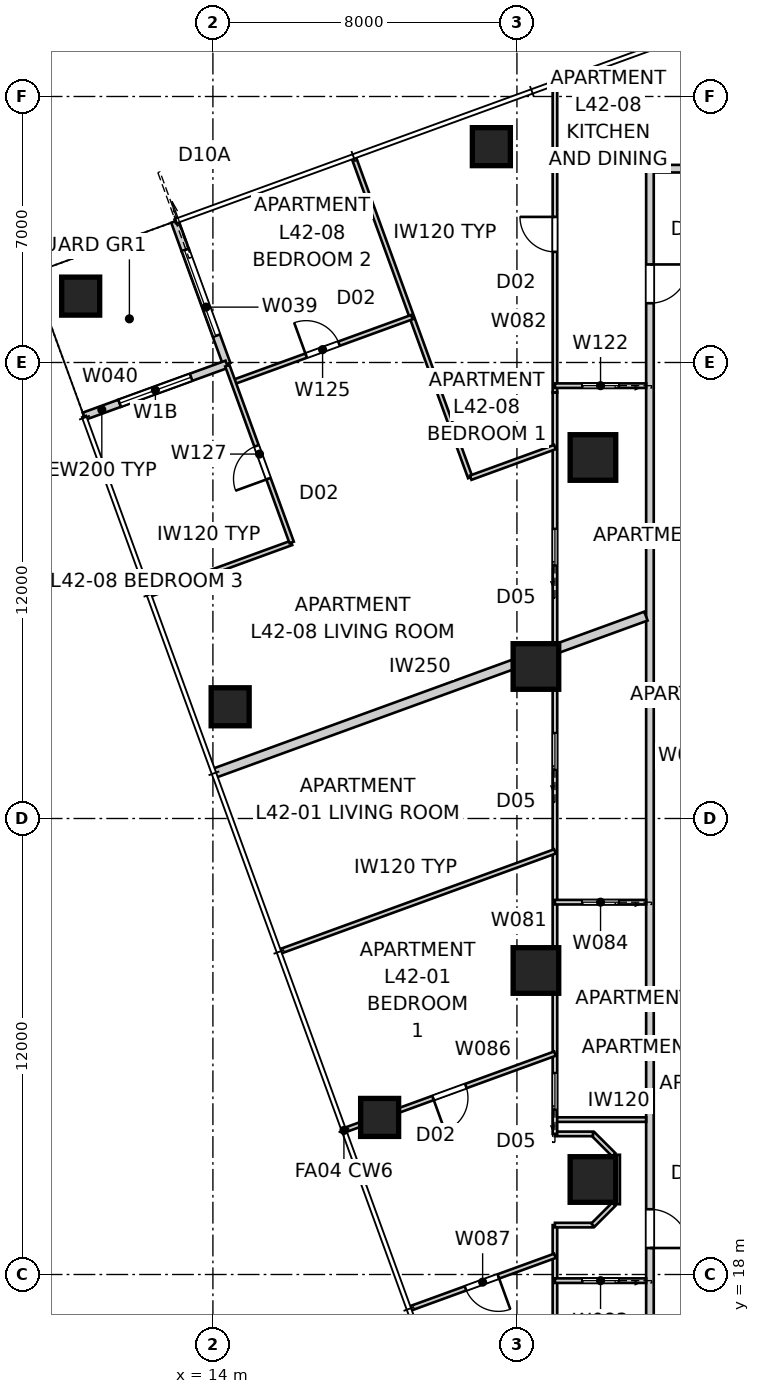
"""IFC4 building model, lengths in metres.
Left out: names, types, materials, properties, quantities, classifications, styles, units other than length and angle.
Written with IfcOpenShell. Run it as: python <this file> out.ifc"""

import sys

from ifc_helpers import new_model, si_unit, direction, frame, frame_2d, origin, origin_2d, place, context, subcontext, project, spatial, rectangle, extrude, element, fill, save


model = new_model("IFC4")
c1 = context("Model", 3, precision=1e-05, world=origin(), true_north=direction((0.0, 1.0)))
c2 = subcontext(c1, "Body", "Model", "MODEL_VIEW")
j1 = project(units=[si_unit("LENGTHUNIT", "METRE"), si_unit("PLANEANGLEUNIT", "RADIAN")], contexts=[c1])
p1 = place(None, origin())
s1 = spatial("IfcSite", under=j1, at=p1, CompositionType="ELEMENT")
p2 = place(p1, origin())
s2 = spatial("IfcBuilding", under=s1, at=p2, CompositionType="ELEMENT")
p3 = place(p2, frame((0.0, 0.0, 154.0)))
s3 = spatial("IfcBuildingStorey", under=s2, at=p3, CompositionType="ELEMENT", Elevation=154.0)
for number, where, z_axis, x_axis in (
    (1, (21.327, 47.68, 0.0), (0.0, 0.0, 1.0), (1.0, 0.0, 0.0)),
    (2, (10.521, 43.747, 0.0), (0.0, 0.0, 1.0), (1.0, 0.0, 0.0)),
    (3, (14.454, 32.94, 0.0), (0.0, 0.0, 1.0), (1.0, 0.0, 0.0)),
    (4, (18.387, 22.134, 0.0), (0.0, 0.0, 1.0), (1.0, 0.0, 0.0)),
):
    element("IfcColumn", number, at=place(p3, frame(where, z_axis=z_axis, x_axis=x_axis)), inside=s3, PredefinedType="COLUMN", context=c2, shape_type="SweptSolid", body=[
        extrude(rectangle(XDim=1.0, YDim=1.0, at=origin_2d()), origin(), (0.0, 0.0, 1.0), 3.4),
    ])
for number, where, z_axis, x_axis in (
    (5, (24.0, 39.5, 0.0), (0.0, 0.0, 1.0), (1.0, 0.0, 0.0)),
    (6, (22.5, 34.0, 0.0), (0.0, 0.0, 1.0), (1.0, 0.0, 0.0)),
    (7, (22.5, 26.0, 0.0), (0.0, 0.0, 1.0), (1.0, 0.0, 0.0)),
    (8, (24.0, 20.5, 0.0), (0.0, 0.0, 1.0), (1.0, 0.0, 0.0)),
):
    element("IfcColumn", number, at=place(p3, frame(where, z_axis=z_axis, x_axis=x_axis)), inside=s3, PredefinedType="COLUMN", context=c2, shape_type="SweptSolid", body=[
        extrude(rectangle(XDim=1.2, YDim=1.2, at=origin_2d()), origin(), (0.0, 0.0, 1.0), 3.4),
    ])
p4 = place(p3, frame((12.998, 45.712, 0.0), z_axis=(0.0, 0.0, 1.0), x_axis=(0.342110593602, -0.939659694648, 0.0)))
e9 = element("IfcWall", 9, at=p4, inside=s3, PredefinedType="SOLIDWALL", context=c2, shape_type="SweptSolid", body=[
    extrude(rectangle(XDim=0.8, YDim=0.2, at=frame_2d((0.4, 0.0))), origin(), (0.0, 0.0, 1.0), 3.25),
])
p5 = place(p3, frame((13.271, 44.96, 0.0), z_axis=(0.0, 0.0, 1.0), x_axis=(0.342018703306, -0.939693144909, 0.0)))
e10 = element("IfcWall", 10, at=p5, inside=s3, PredefinedType="SOLIDWALL", context=c2, shape_type="SweptSolid", body=[
    extrude(rectangle(XDim=3.2, YDim=0.2, at=frame_2d((1.6, 0.0))), origin(), (0.0, 0.0, 1.0), 2.721),
])
p6 = place(p5, origin())
e11 = element("IfcOpeningElement", 11, at=p6, cuts=e10, PredefinedType="OPENING", context=c2, shape_type="SweptSolid", body=[
    extrude(rectangle(XDim=2.4, YDim=2.1, at=frame_2d((1.2, 1.05))), frame((0.0, 0.11, 0.0), z_axis=(0.0, -1.0, 0.0), x_axis=(1.0, 0.0, 0.0)), (0.0, 0.0, 1.0), 0.22),
])
p7 = place(p3, frame((14.366, 41.953, 0.0), z_axis=(0.0, 0.0, 1.0), x_axis=(-0.939712609717, -0.341965219194, 0.0)))
e12 = element("IfcWall", 12, at=p7, inside=s3, PredefinedType="SOLIDWALL", context=c2, shape_type="SweptSolid", body=[
    extrude(rectangle(XDim=3.0, YDim=0.2, at=frame_2d((1.5, 0.0))), origin(), (0.0, 0.0, 1.0), 2.721),
])
p8 = place(p7, frame((1.0, 0.0, 0.45)))
e13 = element("IfcOpeningElement", 13, at=p8, cuts=e12, PredefinedType="OPENING", context=c2, shape_type="SweptSolid", body=[
    extrude(rectangle(XDim=2.0, YDim=1.8, at=frame_2d((1.0, 0.9))), frame((0.0, 0.11, 0.0), z_axis=(0.0, -1.0, 0.0), x_axis=(1.0, 0.0, 0.0)), (0.0, 0.0, 1.0), 0.22),
])
p9 = place(p3, frame((11.547, 40.927, 0.0), z_axis=(0.0, 0.0, 1.0), x_axis=(-0.939686455819, -0.342037080957, 0.0)))
e14 = element("IfcWall", 14, at=p9, inside=s3, PredefinedType="SOLIDWALL", context=c2, shape_type="SweptSolid", body=[
    extrude(rectangle(XDim=1.0, YDim=0.2, at=frame_2d((0.5, 0.0))), origin(), (0.0, 0.0, 1.0), 3.25),
])
p10 = place(p3, frame((33.098, 47.1, 0.0), z_axis=(0.0, 0.0, 1.0), x_axis=(-1.0, 0.0, 0.0)))
e15 = element("IfcWall", 15, at=p10, inside=s3, PredefinedType="PARTITIONING", context=c2, shape_type="SweptSolid", body=[
    extrude(rectangle(XDim=7.598, YDim=0.2, at=frame_2d((3.799, 0.0))), origin(), (0.0, 0.0, 1.0), 3.25),
])
p11 = place(p3, frame((25.5, 47.1, 0.0), z_axis=(0.0, 0.0, 1.0), x_axis=(0.0, -1.0, 0.0)))
e16 = element("IfcWall", 16, at=p11, inside=s3, PredefinedType="PARTITIONING", context=c2, shape_type="SweptSolid", body=[
    extrude(rectangle(XDim=33.4, YDim=0.2, at=frame_2d((16.7, 0.0))), origin(), (0.0, 0.0, 1.0), 3.25),
])
p12 = place(p11, frame((2.52, 0.0, 0.0)))
e17 = element("IfcOpeningElement", 17, at=p12, cuts=e16, PredefinedType="OPENING", context=c2, shape_type="SweptSolid", body=[
    extrude(rectangle(XDim=1.02, YDim=2.34, at=frame_2d((0.51, 1.17))), frame((0.0, 0.11, 0.0), z_axis=(0.0, -1.0, 0.0), x_axis=(1.0, 0.0, 0.0)), (0.0, 0.0, 1.0), 0.22),
])
p13 = place(p11, frame((27.383, 0.0, 0.0)))
e18 = element("IfcOpeningElement", 18, at=p13, cuts=e16, PredefinedType="OPENING", context=c2, shape_type="SweptSolid", body=[
    extrude(rectangle(XDim=1.02, YDim=2.1, at=frame_2d((0.51, 1.05))), frame((0.0, 0.11, 0.0), z_axis=(0.0, -1.0, 0.0), x_axis=(1.0, 0.0, 0.0)), (0.0, 0.0, 1.0), 0.22),
])
p14 = place(p3, frame((14.027, 31.188, 0.0), z_axis=(0.0, 0.0, 1.0), x_axis=(0.939693801585, 0.342016899091, 0.0)))
e19 = element("IfcWall", 19, at=p14, inside=s3, PredefinedType="PARTITIONING", context=c2, shape_type="SweptSolid", body=[
    extrude(rectangle(XDim=12.097, YDim=0.25, at=frame_2d((6.049, 0.0))), origin(), (0.0, 0.0, 1.0), 3.25),
])
p15 = place(p3, frame((23.0, 22.076, 0.0), z_axis=(0.0, 0.0, 1.0), x_axis=(1.0, 0.0, 0.0)))
e20 = element("IfcWall", 20, at=p15, inside=s3, PredefinedType="PARTITIONING", context=c2, shape_type="SweptSolid", body=[
    extrude(rectangle(XDim=2.4, YDim=0.12, at=frame_2d((1.2, 0.0))), origin(), (0.0, 0.0, 1.0), 3.25),
])
p16 = place(p3, frame((23.0, 11.2, 0.0), z_axis=(0.0, 0.0, 1.0), x_axis=(0.0, 1.0, 0.0)))
e21 = element("IfcWall", 21, at=p16, inside=s3, PredefinedType="PARTITIONING", context=c2, shape_type="SweptSolid", body=[
    extrude(rectangle(XDim=8.1, YDim=0.12, at=frame_2d((4.05, 0.0))), origin(), (0.0, 0.0, 1.0), 3.25),
])
p17 = place(p16, frame((3.849, 0.0, 0.0)))
e22 = element("IfcOpeningElement", 22, at=p17, cuts=e21, PredefinedType="OPENING", context=c2, shape_type="SweptSolid", body=[
    extrude(rectangle(XDim=0.96, YDim=2.1, at=frame_2d((0.48, 1.05))), frame((0.0, 0.07, 0.0), z_axis=(0.0, -1.0, 0.0), x_axis=(1.0, 0.0, 0.0)), (0.0, 0.0, 1.0), 0.14),
])
p18 = place(p3, frame((23.0, 19.3, 0.0), z_axis=(0.0, 0.0, 1.0), x_axis=(1.0, 0.0, 0.0)))
e23 = element("IfcWall", 23, at=p18, inside=s3, PredefinedType="PARTITIONING", context=c2, shape_type="SweptSolid", body=[
    extrude(rectangle(XDim=1.0, YDim=0.12, at=frame_2d((0.5, 0.0))), origin(), (0.0, 0.0, 1.0), 3.25),
])
p19 = place(p3, frame((24.0, 19.3, 0.0), z_axis=(0.0, 0.0, 1.0), x_axis=(0.707106781187, 0.707106781187, 0.0)))
e24 = element("IfcWall", 24, at=p19, inside=s3, PredefinedType="PARTITIONING", context=c2, shape_type="SweptSolid", body=[
    extrude(rectangle(XDim=0.778, YDim=0.12, at=frame_2d((0.389, 0.0))), origin(), (0.0, 0.0, 1.0), 3.25),
])
p20 = place(p3, frame((24.65, 19.85, 0.0), z_axis=(0.0, 0.0, 1.0), x_axis=(0.0, 1.0, 0.0)))
e25 = element("IfcWall", 25, at=p20, inside=s3, PredefinedType="PARTITIONING", context=c2, shape_type="SweptSolid", body=[
    extrude(rectangle(XDim=1.3, YDim=0.12, at=frame_2d((0.65, 0.0))), origin(), (0.0, 0.0, 1.0), 3.25),
])
p21 = place(p3, frame((24.55, 21.15, 0.0), z_axis=(0.0, 0.0, 1.0), x_axis=(-0.707106781187, 0.707106781187, 0.0)))
e26 = element("IfcWall", 26, at=p21, inside=s3, PredefinedType="PARTITIONING", context=c2, shape_type="SweptSolid", body=[
    extrude(rectangle(XDim=0.778, YDim=0.12, at=frame_2d((0.389, 0.0))), origin(), (0.0, 0.0, 1.0), 3.25),
])
p22 = place(p3, frame((24.0, 21.7, 0.0), z_axis=(0.0, 0.0, 1.0), x_axis=(-1.0, 0.0, 0.0)))
e27 = element("IfcWall", 27, at=p22, inside=s3, PredefinedType="PARTITIONING", context=c2, shape_type="SweptSolid", body=[
    extrude(rectangle(XDim=1.0, YDim=0.12, at=frame_2d((0.5, 0.0))), origin(), (0.0, 0.0, 1.0), 3.25),
])
p23 = place(p3, frame((23.0, 21.7, 0.0), z_axis=(0.0, 0.0, 1.0), x_axis=(0.0, 1.0, 0.0)))
e28 = element("IfcWall", 28, at=p23, inside=s3, PredefinedType="PARTITIONING", context=c2, shape_type="SweptSolid", body=[
    extrude(rectangle(XDim=19.512, YDim=0.12, at=frame_2d((9.756, 0.0))), origin(), (0.0, 0.0, 1.0), 2.55),
])
p24 = place(p23, frame((14.961, 0.0, 0.0)))
e29 = element("IfcOpeningElement", 29, at=p24, cuts=e28, PredefinedType="OPENING", context=c2, shape_type="SweptSolid", body=[
    extrude(rectangle(XDim=0.96, YDim=2.1, at=frame_2d((0.48, 1.05))), frame((0.0, 0.07, 0.0), z_axis=(0.0, -1.0, 0.0), x_axis=(1.0, 0.0, 0.0)), (0.0, 0.0, 1.0), 0.14),
])
p25 = place(p23, frame((0.641, 0.0, 0.0)))
e30 = element("IfcOpeningElement", 30, at=p25, cuts=e28, PredefinedType="OPENING", context=c2, shape_type="SweptSolid", body=[
    extrude(rectangle(XDim=0.96, YDim=2.1, at=frame_2d((0.48, 1.05))), frame((0.0, 0.07, 0.0), z_axis=(0.0, -1.0, 0.0), x_axis=(1.0, 0.0, 0.0)), (0.0, 0.0, 1.0), 0.14),
])
p26 = place(p23, frame((9.587, 0.0, 0.0)))
e31 = element("IfcOpeningElement", 31, at=p26, cuts=e28, PredefinedType="OPENING", context=c2, shape_type="SweptSolid", body=[
    extrude(rectangle(XDim=0.96, YDim=2.1, at=frame_2d((0.48, 1.05))), frame((0.0, 0.07, 0.0), z_axis=(0.0, -1.0, 0.0), x_axis=(1.0, 0.0, 0.0)), (0.0, 0.0, 1.0), 0.14),
])
p27 = place(p3, frame((25.4, 17.838, 0.0), z_axis=(0.0, 0.0, 1.0), x_axis=(-1.0, 0.0, 0.0)))
e32 = element("IfcWall", 32, at=p27, inside=s3, PredefinedType="PARTITIONING", context=c2, shape_type="SweptSolid", body=[
    extrude(rectangle(XDim=2.4, YDim=0.12, at=frame_2d((1.2, 0.0))), origin(), (0.0, 0.0, 1.0), 3.25),
])
p28 = place(p27, frame((0.72, 0.0, 0.0)))
e33 = element("IfcOpeningElement", 33, at=p28, cuts=e32, PredefinedType="OPENING", context=c2, shape_type="SweptSolid", body=[
    extrude(rectangle(XDim=0.96, YDim=2.1, at=frame_2d((0.48, 1.05))), frame((0.0, 0.07, 0.0), z_axis=(0.0, -1.0, 0.0), x_axis=(1.0, 0.0, 0.0)), (0.0, 0.0, 1.0), 0.14),
])
p29 = place(p3, frame((25.4, 27.798, 0.0), z_axis=(0.0, 0.0, 1.0), x_axis=(-1.0, 0.0, 0.0)))
e34 = element("IfcWall", 34, at=p29, inside=s3, PredefinedType="PARTITIONING", context=c2, shape_type="SweptSolid", body=[
    extrude(rectangle(XDim=2.4, YDim=0.12, at=frame_2d((1.2, 0.0))), origin(), (0.0, 0.0, 1.0), 3.25),
])
p30 = place(p29, frame((0.72, 0.0, 0.0)))
e35 = element("IfcOpeningElement", 35, at=p30, cuts=e34, PredefinedType="OPENING", context=c2, shape_type="SweptSolid", body=[
    extrude(rectangle(XDim=0.96, YDim=2.1, at=frame_2d((0.48, 1.05))), frame((0.0, 0.07, 0.0), z_axis=(0.0, -1.0, 0.0), x_axis=(1.0, 0.0, 0.0)), (0.0, 0.0, 1.0), 0.14),
])
p31 = place(p3, frame((23.0, 29.134, 0.0), z_axis=(0.0, 0.0, 1.0), x_axis=(-0.939685835373, -0.342038785519, 0.0)))
e36 = element("IfcWall", 36, at=p31, inside=s3, PredefinedType="PARTITIONING", context=c2, shape_type="SweptSolid", body=[
    extrude(rectangle(XDim=7.689, YDim=0.12, at=frame_2d((3.844, 0.0))), origin(), (0.0, 0.0, 1.0), 3.25),
])
p32 = place(p3, frame((23.0, 23.812, 0.0), z_axis=(0.0, 0.0, 1.0), x_axis=(-0.939693791822, -0.342016925912, 0.0)))
e37 = element("IfcWall", 37, at=p32, inside=s3, PredefinedType="PARTITIONING", context=c2, shape_type="SweptSolid", body=[
    extrude(rectangle(XDim=5.869, YDim=0.12, at=frame_2d((2.935, 0.0))), origin(), (0.0, 0.0, 1.0), 3.25),
])
p33 = place(p32, frame((2.494, 0.0, 0.0)))
e38 = element("IfcOpeningElement", 38, at=p33, cuts=e37, PredefinedType="OPENING", context=c2, shape_type="SweptSolid", body=[
    extrude(rectangle(XDim=0.92, YDim=2.34, at=frame_2d((0.46, 1.17))), frame((0.0, 0.07, 0.0), z_axis=(0.0, -1.0, 0.0), x_axis=(1.0, 0.0, 0.0)), (0.0, 0.0, 1.0), 0.14),
])
p34 = place(p3, frame((23.0, 18.492, 0.0), z_axis=(0.0, 0.0, 1.0), x_axis=(-0.939682468191, -0.342048036063, 0.0)))
e39 = element("IfcWall", 39, at=p34, inside=s3, PredefinedType="PARTITIONING", context=c2, shape_type="SweptSolid", body=[
    extrude(rectangle(XDim=4.049, YDim=0.12, at=frame_2d((2.024, 0.0))), origin(), (0.0, 0.0, 1.0), 3.25),
])
p35 = place(p34, frame((1.584, 0.0, 0.0)))
e40 = element("IfcOpeningElement", 40, at=p35, cuts=e39, PredefinedType="OPENING", context=c2, shape_type="SweptSolid", body=[
    extrude(rectangle(XDim=0.92, YDim=2.34, at=frame_2d((0.46, 1.17))), frame((0.0, 0.07, 0.0), z_axis=(0.0, -1.0, 0.0), x_axis=(1.0, 0.0, 0.0)), (0.0, 0.0, 1.0), 0.14),
])
p36 = place(p3, frame((25.4, 41.39, 0.0), z_axis=(0.0, 0.0, 1.0), x_axis=(-1.0, 0.0, 0.0)))
e41 = element("IfcWall", 41, at=p36, inside=s3, PredefinedType="PARTITIONING", context=c2, shape_type="SweptSolid", body=[
    extrude(rectangle(XDim=2.4, YDim=0.12, at=frame_2d((1.2, 0.0))), origin(), (0.0, 0.0, 1.0), 3.25),
])
p37 = place(p36, frame((0.72, 0.0, 0.0)))
e42 = element("IfcOpeningElement", 42, at=p37, cuts=e41, PredefinedType="OPENING", context=c2, shape_type="SweptSolid", body=[
    extrude(rectangle(XDim=0.96, YDim=2.1, at=frame_2d((0.48, 1.05))), frame((0.0, 0.07, 0.0), z_axis=(0.0, -1.0, 0.0), x_axis=(1.0, 0.0, 0.0)), (0.0, 0.0, 1.0), 0.14),
])
p38 = place(p3, frame((17.71, 47.385, 0.0), z_axis=(0.0, 0.0, 1.0), x_axis=(0.342034340019, -0.939687453491, 0.0)))
e43 = element("IfcWall", 43, at=p38, inside=s3, PredefinedType="PARTITIONING", context=c2, shape_type="SweptSolid", body=[
    extrude(rectangle(XDim=8.95, YDim=0.12, at=frame_2d((4.475, 0.0))), origin(), (0.0, 0.0, 1.0), 3.25),
])
p39 = place(p3, frame((20.784, 38.969, 0.0), z_axis=(0.0, 0.0, 1.0), x_axis=(0.939696672396, 0.342009011412, 0.0)))
e44 = element("IfcWall", 44, at=p39, inside=s3, PredefinedType="PARTITIONING", context=c2, shape_type="SweptSolid", body=[
    extrude(rectangle(XDim=2.359, YDim=0.12, at=frame_2d((1.179, 0.0))), origin(), (0.0, 0.0, 1.0), 3.25),
])
p40 = place(p3, frame((14.537, 41.484, 0.0), z_axis=(0.0, 0.0, 1.0), x_axis=(0.939696437289, 0.342009657388, 0.0)))
e45 = element("IfcWall", 45, at=p40, inside=s3, PredefinedType="PARTITIONING", context=c2, shape_type="SweptSolid", body=[
    extrude(rectangle(XDim=5.0, YDim=0.12, at=frame_2d((2.5, 0.0))), origin(), (0.0, 0.0, 1.0), 3.25),
])
p41 = place(p40, frame((2.04, 0.0, 0.0)))
e46 = element("IfcOpeningElement", 46, at=p41, cuts=e45, PredefinedType="OPENING", context=c2, shape_type="SweptSolid", body=[
    extrude(rectangle(XDim=0.92, YDim=2.34, at=frame_2d((0.46, 1.17))), frame((0.0, 0.07, 0.0), z_axis=(0.0, -1.0, 0.0), x_axis=(1.0, 0.0, 0.0)), (0.0, 0.0, 1.0), 0.14),
])
p42 = place(p3, frame((12.355, 35.901, 0.0), z_axis=(0.0, 0.0, 1.0), x_axis=(0.939701350773, 0.341996156931, 0.0)))
e47 = element("IfcWall", 47, at=p42, inside=s3, PredefinedType="PARTITIONING", context=c2, shape_type="SweptSolid", body=[
    extrude(rectangle(XDim=3.95, YDim=0.12, at=frame_2d((1.975, 0.0))), origin(), (0.0, 0.0, 1.0), 3.25),
])
p43 = place(p3, frame((16.073, 37.264, 0.0), z_axis=(0.0, 0.0, 1.0), x_axis=(-0.34204797738, 0.939682489552, 0.0)))
e48 = element("IfcWall", 48, at=p43, inside=s3, PredefinedType="PARTITIONING", context=c2, shape_type="SweptSolid", body=[
    extrude(rectangle(XDim=4.95, YDim=0.12, at=frame_2d((2.475, 0.0))), origin(), (0.0, 0.0, 1.0), 3.25),
])
p44 = place(p43, frame((1.785, 0.0, 0.0)))
e49 = element("IfcOpeningElement", 49, at=p44, cuts=e48, PredefinedType="OPENING", context=c2, shape_type="SweptSolid", body=[
    extrude(rectangle(XDim=0.92, YDim=2.34, at=frame_2d((0.46, 1.17))), frame((0.0, 0.07, 0.0), z_axis=(0.0, -1.0, 0.0), x_axis=(1.0, 0.0, 0.0)), (0.0, 0.0, 1.0), 0.14),
])
p45 = place(p3, frame((23.0, 41.212, 0.0), z_axis=(0.0, 0.0, 1.0), x_axis=(0.0, 1.0, 0.0)))
e50 = element("IfcWall", 50, at=p45, inside=s3, PredefinedType="PARTITIONING", context=c2, shape_type="SweptSolid", body=[
    extrude(rectangle(XDim=8.098, YDim=0.12, at=frame_2d((4.049, 0.0))), origin(), (0.0, 0.0, 1.0), 3.25),
])
p46 = place(p45, frame((3.699, 0.0, 0.0)))
e51 = element("IfcOpeningElement", 51, at=p46, cuts=e50, PredefinedType="OPENING", context=c2, shape_type="SweptSolid", body=[
    extrude(rectangle(XDim=0.92, YDim=2.34, at=frame_2d((0.46, 1.17))), frame((0.0, 0.07, 0.0), z_axis=(0.0, -1.0, 0.0), x_axis=(1.0, 0.0, 0.0)), (0.0, 0.0, 1.0), 0.14),
])
p47 = place(p6, origin())
e52 = element("IfcDoor", 52, at=p47, inside=s3, OperationType="SLIDING_TO_LEFT", PredefinedType="DOOR", context=c2, shape_type="SweptSolid", body=[
    extrude(rectangle(XDim=2.4, YDim=2.1, at=frame_2d((1.2, 1.05))), frame((0.0, 0.025, 0.0), z_axis=(0.0, -1.0, 0.0), x_axis=(1.0, 0.0, 0.0)), (0.0, 0.0, 1.0), 0.05),
])
fill(e11, e52)
p48 = place(p8, origin())
e53 = element("IfcWindow", 53, at=p48, inside=s3, PartitioningType="SINGLE_PANEL", PredefinedType="WINDOW", context=c2, shape_type="SweptSolid", body=[
    extrude(rectangle(XDim=2.0, YDim=1.8, at=frame_2d((1.0, 0.9))), frame((0.0, 0.03, 0.0), z_axis=(0.0, -1.0, 0.0), x_axis=(1.0, 0.0, 0.0)), (0.0, 0.0, 1.0), 0.06),
])
fill(e13, e53)
p49 = place(p12, origin())
e54 = element("IfcDoor", 54, at=p49, inside=s3, OperationType="SINGLE_SWING_LEFT", PredefinedType="DOOR", context=c2, shape_type="SweptSolid", body=[
    extrude(rectangle(XDim=1.02, YDim=2.34, at=frame_2d((0.51, 1.17))), frame((0.0, 0.025, 0.0), z_axis=(0.0, -1.0, 0.0), x_axis=(1.0, 0.0, 0.0)), (0.0, 0.0, 1.0), 0.05),
])
fill(e17, e54)
p50 = place(p13, origin())
e55 = element("IfcDoor", 55, at=p50, inside=s3, OperationType="SINGLE_SWING_RIGHT", PredefinedType="DOOR", context=c2, shape_type="SweptSolid", body=[
    extrude(rectangle(XDim=1.02, YDim=2.1, at=frame_2d((0.51, 1.05))), frame((0.0, 0.025, 0.0), z_axis=(0.0, -1.0, 0.0), x_axis=(1.0, 0.0, 0.0)), (0.0, 0.0, 1.0), 0.05),
])
fill(e18, e55)
p51 = place(p46, origin())
e56 = element("IfcDoor", 56, at=p51, inside=s3, OperationType="SINGLE_SWING_RIGHT", PredefinedType="DOOR", context=c2, shape_type="SweptSolid", body=[
    extrude(rectangle(XDim=0.92, YDim=2.34, at=frame_2d((0.46, 1.17))), frame((0.0, 0.025, 0.0), z_axis=(0.0, -1.0, 0.0), x_axis=(1.0, 0.0, 0.0)), (0.0, 0.0, 1.0), 0.05),
])
fill(e51, e56)
p52 = place(p37, origin())
e57 = element("IfcDoor", 57, at=p52, inside=s3, OperationType="SLIDING_TO_LEFT", PredefinedType="DOOR", context=c2, shape_type="SweptSolid", body=[
    extrude(rectangle(XDim=0.96, YDim=2.1, at=frame_2d((0.48, 1.05))), frame((0.0, 0.025, 0.0), z_axis=(0.0, -1.0, 0.0), x_axis=(1.0, 0.0, 0.0)), (0.0, 0.0, 1.0), 0.05),
])
fill(e42, e57)
p53 = place(p28, origin())
e58 = element("IfcDoor", 58, at=p53, inside=s3, OperationType="SLIDING_TO_LEFT", PredefinedType="DOOR", context=c2, shape_type="SweptSolid", body=[
    extrude(rectangle(XDim=0.96, YDim=2.1, at=frame_2d((0.48, 1.05))), frame((0.0, 0.025, 0.0), z_axis=(0.0, -1.0, 0.0), x_axis=(1.0, 0.0, 0.0)), (0.0, 0.0, 1.0), 0.05),
])
fill(e33, e58)
p54 = place(p24, origin())
e59 = element("IfcDoor", 59, at=p54, inside=s3, OperationType="SLIDING_TO_LEFT", PredefinedType="DOOR", context=c2, shape_type="SweptSolid", body=[
    extrude(rectangle(XDim=0.96, YDim=2.1, at=frame_2d((0.48, 1.05))), frame((0.0, 0.025, 0.0), z_axis=(0.0, -1.0, 0.0), x_axis=(1.0, 0.0, 0.0)), (0.0, 0.0, 1.0), 0.05),
])
fill(e29, e59)
p55 = place(p41, origin())
e60 = element("IfcDoor", 60, at=p55, inside=s3, OperationType="SINGLE_SWING_LEFT", PredefinedType="DOOR", context=c2, shape_type="SweptSolid", body=[
    extrude(rectangle(XDim=0.92, YDim=2.34, at=frame_2d((0.46, 1.17))), frame((0.0, 0.025, 0.0), z_axis=(0.0, -1.0, 0.0), x_axis=(1.0, 0.0, 0.0)), (0.0, 0.0, 1.0), 0.05),
])
fill(e46, e60)
p56 = place(p44, origin())
e61 = element("IfcDoor", 61, at=p56, inside=s3, OperationType="SINGLE_SWING_LEFT", PredefinedType="DOOR", context=c2, shape_type="SweptSolid", body=[
    extrude(rectangle(XDim=0.92, YDim=2.34, at=frame_2d((0.46, 1.17))), frame((0.0, 0.025, 0.0), z_axis=(0.0, -1.0, 0.0), x_axis=(1.0, 0.0, 0.0)), (0.0, 0.0, 1.0), 0.05),
])
fill(e49, e61)
p57 = place(p35, origin())
e62 = element("IfcDoor", 62, at=p57, inside=s3, OperationType="SINGLE_SWING_LEFT", PredefinedType="DOOR", context=c2, shape_type="SweptSolid", body=[
    extrude(rectangle(XDim=0.92, YDim=2.34, at=frame_2d((0.46, 1.17))), frame((0.0, 0.025, 0.0), z_axis=(0.0, -1.0, 0.0), x_axis=(1.0, 0.0, 0.0)), (0.0, 0.0, 1.0), 0.05),
])
fill(e40, e62)
p58 = place(p33, origin())
e63 = element("IfcDoor", 63, at=p58, inside=s3, OperationType="SINGLE_SWING_RIGHT", PredefinedType="DOOR", context=c2, shape_type="SweptSolid", body=[
    extrude(rectangle(XDim=0.92, YDim=2.34, at=frame_2d((0.46, 1.17))), frame((0.0, 0.025, 0.0), z_axis=(0.0, -1.0, 0.0), x_axis=(1.0, 0.0, 0.0)), (0.0, 0.0, 1.0), 0.05),
])
fill(e38, e63)
p59 = place(p25, origin())
e64 = element("IfcDoor", 64, at=p59, inside=s3, OperationType="SLIDING_TO_LEFT", PredefinedType="DOOR", context=c2, shape_type="SweptSolid", body=[
    extrude(rectangle(XDim=0.96, YDim=2.1, at=frame_2d((0.48, 1.05))), frame((0.0, 0.025, 0.0), z_axis=(0.0, -1.0, 0.0), x_axis=(1.0, 0.0, 0.0)), (0.0, 0.0, 1.0), 0.05),
])
fill(e30, e64)
p60 = place(p30, origin())
e65 = element("IfcDoor", 65, at=p60, inside=s3, OperationType="SLIDING_TO_LEFT", PredefinedType="DOOR", context=c2, shape_type="SweptSolid", body=[
    extrude(rectangle(XDim=0.96, YDim=2.1, at=frame_2d((0.48, 1.05))), frame((0.0, 0.025, 0.0), z_axis=(0.0, -1.0, 0.0), x_axis=(1.0, 0.0, 0.0)), (0.0, 0.0, 1.0), 0.05),
])
fill(e35, e65)
p61 = place(p26, origin())
e66 = element("IfcDoor", 66, at=p61, inside=s3, OperationType="SLIDING_TO_LEFT", PredefinedType="DOOR", context=c2, shape_type="SweptSolid", body=[
    extrude(rectangle(XDim=0.96, YDim=2.1, at=frame_2d((0.48, 1.05))), frame((0.0, 0.025, 0.0), z_axis=(0.0, -1.0, 0.0), x_axis=(1.0, 0.0, 0.0)), (0.0, 0.0, 1.0), 0.05),
])
fill(e31, e66)
save(model, sys.argv[1])
